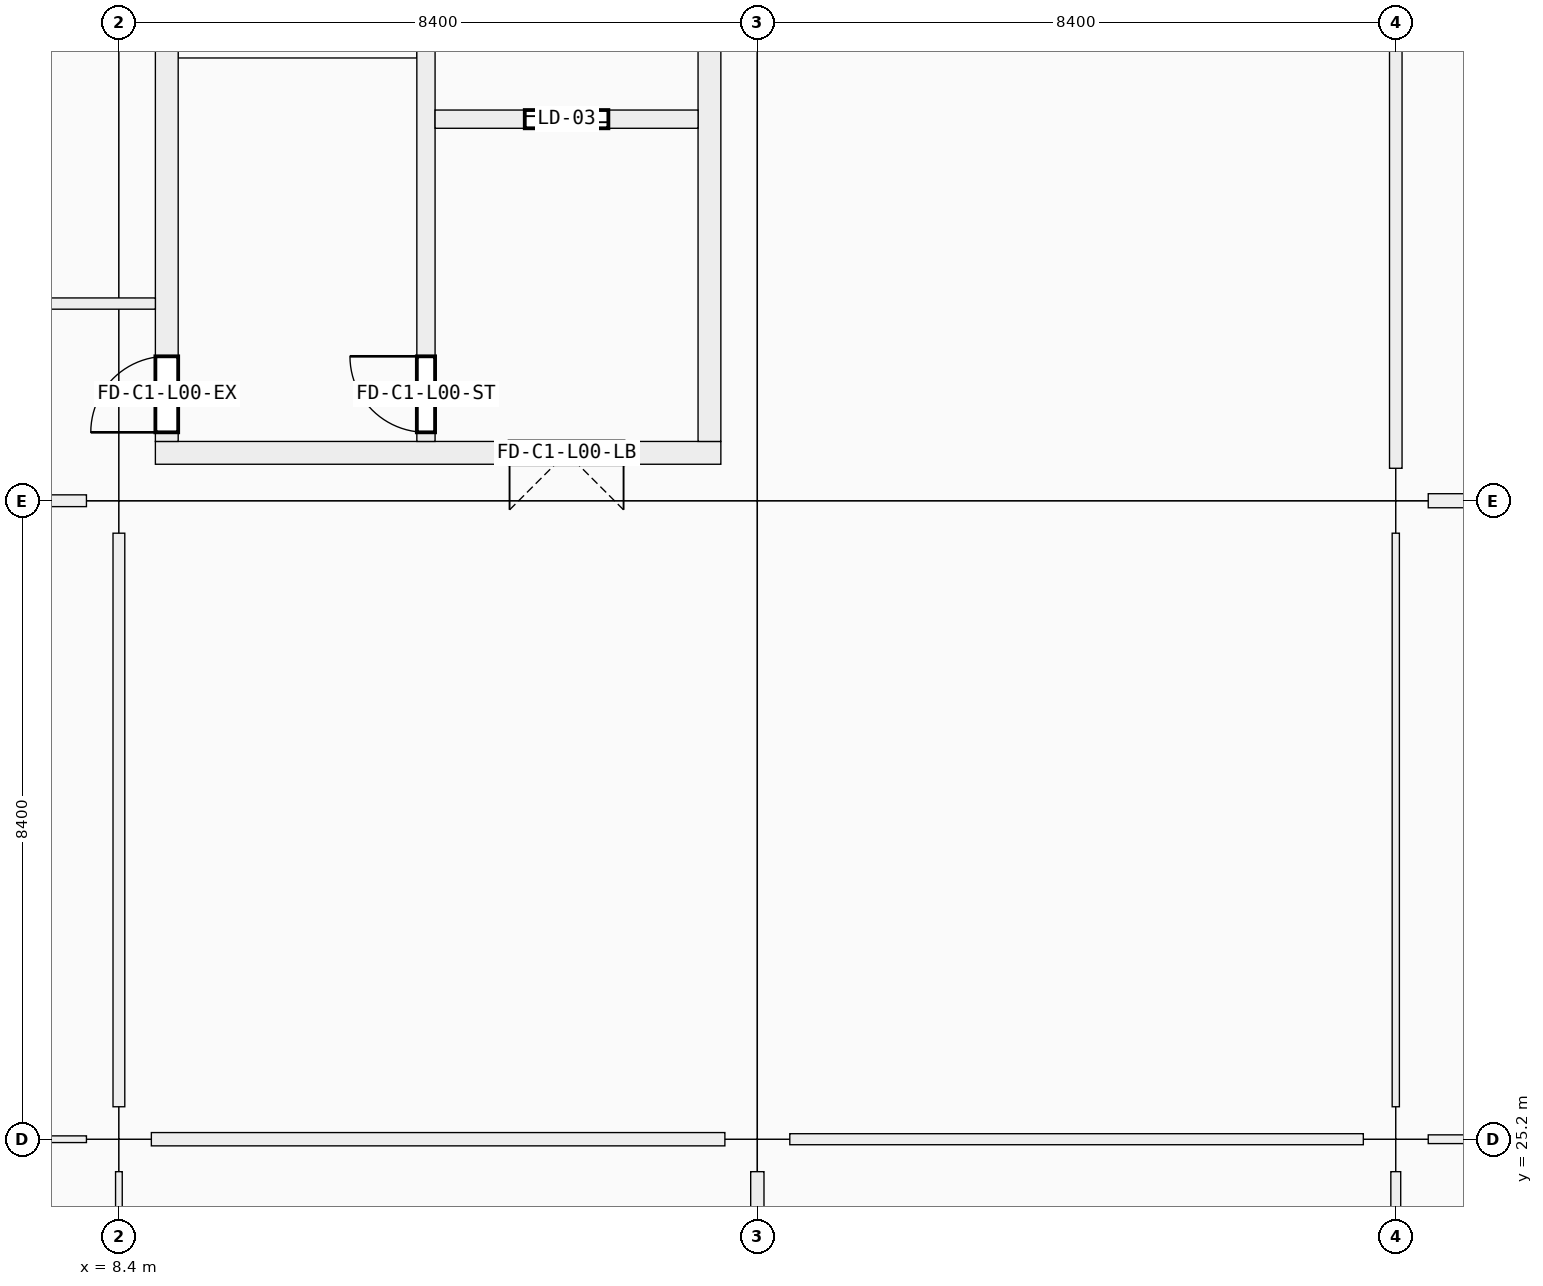
"""IFC4 building model, lengths in metres.
Left out: names, types, materials, properties, quantities, classifications, styles, units other than length and angle.
Written with IfcOpenShell. Run it as: python <this file> out.ifc"""

import sys

from ifc_helpers import new_model, si_unit, direction, frame, frame_2d, origin, origin_2d, place, context, subcontext, project, spatial, rectangle, extrude, element, fill, save


model = new_model("IFC4")
c1 = context("Model", 3, precision=1e-05, world=origin(), true_north=direction((0.0, 1.0)))
c2 = subcontext(c1, "Body", "Model", "MODEL_VIEW")
j1 = project(units=[si_unit("LENGTHUNIT", "METRE"), si_unit("PLANEANGLEUNIT", "RADIAN")], contexts=[c1])
p1 = place(None, origin())
s1 = spatial("IfcSite", under=j1, at=p1, CompositionType="ELEMENT")
p2 = place(p1, origin())
s2 = spatial("IfcBuilding", under=s1, at=p2, CompositionType="ELEMENT")
p3 = place(p2, origin())
s3 = spatial("IfcBuildingStorey", under=s2, at=p3, CompositionType="ELEMENT", Elevation=0.0)
for number, where, z_axis, x_axis in (
    (1, (8.4, 25.2, 0.0), (0.0, 0.0, 1.0), (1.0, 0.0, 0.0)),
    (2, (8.4, 33.6, 0.0), (0.0, 0.0, 1.0), (1.0, 0.0, 0.0)),
    (3, (16.8, 25.2, 0.0), (0.0, 0.0, 1.0), (1.0, 0.0, 0.0)),
    (4, (16.8, 33.6, 0.0), (0.0, 0.0, 1.0), (1.0, 0.0, 0.0)),
    (5, (25.2, 25.2, 0.0), (0.0, 0.0, 1.0), (1.0, 0.0, 0.0)),
    (6, (25.2, 33.6, 0.0), (0.0, 0.0, 1.0), (1.0, 0.0, 0.0)),
):
    element("IfcColumn", number, at=place(p3, frame(where, z_axis=z_axis, x_axis=x_axis)), inside=s3, PredefinedType="COLUMN", context=c2, shape_type="SweptSolid", body=[
        extrude(rectangle(XDim=0.85, YDim=0.85, at=origin_2d()), origin(), (0.0, 0.0, 1.0), 5.76),
    ])
p4 = place(p3, frame((16.32, 34.23, 0.0), z_axis=(0.0, 0.0, 1.0), x_axis=(-1.0, 0.0, 0.0)))
e7 = element("IfcWall", 7, at=p4, inside=s3, PredefinedType="SHEAR", context=c2, shape_type="SweptSolid", body=[
    extrude(rectangle(XDim=7.44, YDim=0.3, at=frame_2d((3.72, 0.0))), origin(), (0.0, 0.0, 1.0), 5.76),
])
p5 = place(p4, frame((1.28, 0.0, 0.0)))
e8 = element("IfcOpeningElement", 8, at=p5, cuts=e7, PredefinedType="OPENING", context=c2, shape_type="SweptSolid", body=[
    extrude(rectangle(XDim=1.5, YDim=2.15, at=frame_2d((0.75, 1.075))), frame((0.0, 0.15, 0.0), z_axis=(0.0, -1.0, 0.0), x_axis=(1.0, 0.0, 0.0)), (0.0, 0.0, 1.0), 0.3),
])
p6 = place(p3, frame((9.03, 34.38, 0.0), z_axis=(0.0, 0.0, 1.0), x_axis=(0.0, 1.0, 0.0)))
e9 = element("IfcWall", 9, at=p6, inside=s3, PredefinedType="SHEAR", context=c2, shape_type="SweptSolid", body=[
    extrude(rectangle(XDim=6.84, YDim=0.3, at=frame_2d((3.42, 0.0))), origin(), (0.0, 0.0, 1.0), 5.76),
])
p7 = place(p6, frame((0.12, 0.0, 0.0)))
e10 = element("IfcOpeningElement", 10, at=p7, cuts=e9, PredefinedType="OPENING", context=c2, shape_type="SweptSolid", body=[
    extrude(rectangle(XDim=1.0, YDim=2.15, at=frame_2d((0.5, 1.075))), frame((0.0, 0.15, 0.0), z_axis=(0.0, -1.0, 0.0), x_axis=(1.0, 0.0, 0.0)), (0.0, 0.0, 1.0), 0.3),
])
p8 = place(p3, frame((16.17, 41.22, 0.0), z_axis=(0.0, 0.0, 1.0), x_axis=(0.0, -1.0, 0.0)))
e11 = element("IfcWall", 11, at=p8, inside=s3, PredefinedType="SHEAR", context=c2, shape_type="SweptSolid", body=[
    extrude(rectangle(XDim=6.84, YDim=0.3, at=frame_2d((3.42, 0.0))), origin(), (0.0, 0.0, 1.0), 5.76),
])
p9 = place(p3, frame((12.44, 34.38, 0.0), z_axis=(0.0, 0.0, 1.0), x_axis=(0.0, 1.0, 0.0)))
e12 = element("IfcWall", 12, at=p9, inside=s3, PredefinedType="SHEAR", context=c2, shape_type="SweptSolid", body=[
    extrude(rectangle(XDim=6.84, YDim=0.24, at=frame_2d((3.42, 0.0))), origin(), (0.0, 0.0, 1.0), 5.76),
])
p10 = place(p9, frame((0.12, 0.0, 0.0)))
e13 = element("IfcOpeningElement", 13, at=p10, cuts=e12, PredefinedType="OPENING", context=c2, shape_type="SweptSolid", body=[
    extrude(rectangle(XDim=1.0, YDim=2.15, at=frame_2d((0.5, 1.075))), frame((0.0, 0.12, 0.0), z_axis=(0.0, -1.0, 0.0), x_axis=(1.0, 0.0, 0.0)), (0.0, 0.0, 1.0), 0.24),
])
p11 = place(p3, frame((12.56, 38.62, 0.0), z_axis=(0.0, 0.0, 1.0), x_axis=(1.0, 0.0, 0.0)))
e14 = element("IfcWall", 14, at=p11, inside=s3, PredefinedType="SHEAR", context=c2, shape_type="SweptSolid", body=[
    extrude(rectangle(XDim=3.46, YDim=0.24, at=frame_2d((1.73, 0.0))), origin(), (0.0, 0.0, 1.0), 5.76),
])
p12 = place(p11, frame((1.18, 0.0, 0.0)))
e15 = element("IfcOpeningElement", 15, at=p12, cuts=e14, PredefinedType="OPENING", context=c2, shape_type="SweptSolid", body=[
    extrude(rectangle(XDim=1.1, YDim=2.15, at=frame_2d((0.55, 1.075))), frame((0.0, 0.12, 0.0), z_axis=(0.0, -1.0, 0.0), x_axis=(1.0, 0.0, 0.0)), (0.0, 0.0, 1.0), 0.24),
])
p13 = place(p3, frame((0.302, 25.2, 0.0), z_axis=(0.0, 0.0, 1.0), x_axis=(1.0, 0.0, 0.0)))
e16 = element("IfcWall", 16, at=p13, inside=s3, PredefinedType="PARTITIONING", context=c2, shape_type="SweptSolid", body=[
    extrude(rectangle(XDim=7.671, YDim=0.088, at=frame_2d((3.835, 0.0))), origin(), (0.0, 0.0, 1.0), 3.66),
])
p14 = place(p13, frame((3.311, 0.0, 0.0)))
e17 = element("IfcOpeningElement", 17, at=p14, cuts=e16, PredefinedType="OPENING", context=c2, shape_type="SweptSolid", body=[
    extrude(rectangle(XDim=1.05, YDim=2.12, at=frame_2d((0.525, 1.06))), frame((0.0, 0.044, 0.0), z_axis=(0.0, -1.0, 0.0), x_axis=(1.0, 0.0, 0.0)), (0.0, 0.0, 1.0), 0.088),
])
p15 = place(p3, frame((0.327, 33.6, 0.0), z_axis=(0.0, 0.0, 1.0), x_axis=(1.0, 0.0, 0.0)))
e18 = element("IfcWall", 18, at=p15, inside=s3, PredefinedType="PARTITIONING", context=c2, shape_type="SweptSolid", body=[
    extrude(rectangle(XDim=7.646, YDim=0.155, at=frame_2d((3.823, 0.0))), origin(), (0.0, 0.0, 1.0), 3.66),
])
p16 = place(p15, frame((3.283, 0.0, 0.0)))
e19 = element("IfcOpeningElement", 19, at=p16, cuts=e18, PredefinedType="OPENING", context=c2, shape_type="SweptSolid", body=[
    extrude(rectangle(XDim=1.08, YDim=2.25, at=frame_2d((0.54, 1.125))), frame((0.0, 0.078, 0.0), z_axis=(0.0, -1.0, 0.0), x_axis=(1.0, 0.0, 0.0)), (0.0, 0.0, 1.0), 0.155),
])
p17 = place(p3, frame((8.827, 25.2, 0.0), z_axis=(0.0, 0.0, 1.0), x_axis=(1.0, 0.0, 0.0)))
e20 = element("IfcWall", 20, at=p17, inside=s3, PredefinedType="PARTITIONING", context=c2, shape_type="SweptSolid", body=[
    extrude(rectangle(XDim=7.546, YDim=0.175, at=frame_2d((3.773, 0.0))), origin(), (0.0, 0.0, 1.0), 3.66),
])
p18 = place(p17, frame((3.253, 0.0, 0.0)))
e21 = element("IfcOpeningElement", 21, at=p18, cuts=e20, PredefinedType="OPENING", context=c2, shape_type="SweptSolid", body=[
    extrude(rectangle(XDim=1.04, YDim=2.2, at=frame_2d((0.52, 1.1))), frame((0.0, 0.087, 0.0), z_axis=(0.0, -1.0, 0.0), x_axis=(1.0, 0.0, 0.0)), (0.0, 0.0, 1.0), 0.175),
])
p19 = place(p3, frame((17.227, 25.2, 0.0), z_axis=(0.0, 0.0, 1.0), x_axis=(1.0, 0.0, 0.0)))
e22 = element("IfcWall", 22, at=p19, inside=s3, PredefinedType="PARTITIONING", context=c2, shape_type="SweptSolid", body=[
    extrude(rectangle(XDim=7.546, YDim=0.145, at=frame_2d((3.773, 0.0))), origin(), (0.0, 0.0, 1.0), 3.66),
])
p20 = place(p19, frame((3.273, 0.0, 0.0)))
e23 = element("IfcOpeningElement", 23, at=p20, cuts=e22, PredefinedType="OPENING", context=c2, shape_type="SweptSolid", body=[
    extrude(rectangle(XDim=1.0, YDim=2.2, at=frame_2d((0.5, 1.1))), frame((0.0, 0.073, 0.0), z_axis=(0.0, -1.0, 0.0), x_axis=(1.0, 0.0, 0.0)), (0.0, 0.0, 1.0), 0.145),
])
p21 = place(p3, frame((25.627, 25.2, 0.0), z_axis=(0.0, 0.0, 1.0), x_axis=(1.0, 0.0, 0.0)))
e24 = element("IfcWall", 24, at=p21, inside=s3, PredefinedType="PARTITIONING", context=c2, shape_type="SweptSolid", body=[
    extrude(rectangle(XDim=7.546, YDim=0.115, at=frame_2d((3.773, 0.0))), origin(), (0.0, 0.0, 1.0), 3.66),
])
p22 = place(p21, frame((3.288, 0.0, 0.0)))
e25 = element("IfcOpeningElement", 25, at=p22, cuts=e24, PredefinedType="OPENING", context=c2, shape_type="SweptSolid", body=[
    extrude(rectangle(XDim=0.97, YDim=2.12, at=frame_2d((0.485, 1.06))), frame((0.0, 0.058, 0.0), z_axis=(0.0, -1.0, 0.0), x_axis=(1.0, 0.0, 0.0)), (0.0, 0.0, 1.0), 0.115),
])
p23 = place(p3, frame((25.627, 33.6, 0.0), z_axis=(0.0, 0.0, 1.0), x_axis=(1.0, 0.0, 0.0)))
e26 = element("IfcWall", 26, at=p23, inside=s3, PredefinedType="PARTITIONING", context=c2, shape_type="SweptSolid", body=[
    extrude(rectangle(XDim=7.546, YDim=0.185, at=frame_2d((3.773, 0.0))), origin(), (0.0, 0.0, 1.0), 3.66),
])
p24 = place(p23, frame((3.308, 0.0, 0.0)))
e27 = element("IfcOpeningElement", 27, at=p24, cuts=e26, PredefinedType="OPENING", context=c2, shape_type="SweptSolid", body=[
    extrude(rectangle(XDim=0.93, YDim=2.12, at=frame_2d((0.465, 1.06))), frame((0.0, 0.093, 0.0), z_axis=(0.0, -1.0, 0.0), x_axis=(1.0, 0.0, 0.0)), (0.0, 0.0, 1.0), 0.185),
])
p25 = place(p3, frame((8.4, 17.227, 0.0), z_axis=(0.0, 0.0, 1.0), x_axis=(0.0, 1.0, 0.0)))
e28 = element("IfcWall", 28, at=p25, inside=s3, PredefinedType="PARTITIONING", context=c2, shape_type="SweptSolid", body=[
    extrude(rectangle(XDim=7.546, YDim=0.088, at=frame_2d((3.773, 0.0))), origin(), (0.0, 0.0, 1.0), 3.66),
])
p26 = place(p25, frame((3.293, 0.0, 0.0)))
e29 = element("IfcOpeningElement", 29, at=p26, cuts=e28, PredefinedType="OPENING", context=c2, shape_type="SweptSolid", body=[
    extrude(rectangle(XDim=0.96, YDim=2.18, at=frame_2d((0.48, 1.09))), frame((0.0, 0.044, 0.0), z_axis=(0.0, -1.0, 0.0), x_axis=(1.0, 0.0, 0.0)), (0.0, 0.0, 1.0), 0.088),
])
p27 = place(p3, frame((8.4, 25.627, 0.0), z_axis=(0.0, 0.0, 1.0), x_axis=(0.0, 1.0, 0.0)))
e30 = element("IfcWall", 30, at=p27, inside=s3, PredefinedType="PARTITIONING", context=c2, shape_type="SweptSolid", body=[
    extrude(rectangle(XDim=7.546, YDim=0.155, at=frame_2d((3.773, 0.0))), origin(), (0.0, 0.0, 1.0), 3.66),
])
p28 = place(p27, frame((3.253, 0.0, 0.0)))
e31 = element("IfcOpeningElement", 31, at=p28, cuts=e30, PredefinedType="OPENING", context=c2, shape_type="SweptSolid", body=[
    extrude(rectangle(XDim=1.04, YDim=2.2, at=frame_2d((0.52, 1.1))), frame((0.0, 0.078, 0.0), z_axis=(0.0, -1.0, 0.0), x_axis=(1.0, 0.0, 0.0)), (0.0, 0.0, 1.0), 0.155),
])
p29 = place(p3, frame((16.8, 17.227, 0.0), z_axis=(0.0, 0.0, 1.0), x_axis=(0.0, 1.0, 0.0)))
e32 = element("IfcWall", 32, at=p29, inside=s3, PredefinedType="PARTITIONING", context=c2, shape_type="SweptSolid", body=[
    extrude(rectangle(XDim=7.546, YDim=0.175, at=frame_2d((3.773, 0.0))), origin(), (0.0, 0.0, 1.0), 3.66),
])
p30 = place(p29, frame((3.313, 0.0, 0.0)))
e33 = element("IfcOpeningElement", 33, at=p30, cuts=e32, PredefinedType="OPENING", context=c2, shape_type="SweptSolid", body=[
    extrude(rectangle(XDim=0.92, YDim=2.15, at=frame_2d((0.46, 1.075))), frame((0.0, 0.087, 0.0), z_axis=(0.0, -1.0, 0.0), x_axis=(1.0, 0.0, 0.0)), (0.0, 0.0, 1.0), 0.175),
])
p31 = place(p3, frame((25.2, 17.227, 0.0), z_axis=(0.0, 0.0, 1.0), x_axis=(0.0, 1.0, 0.0)))
e34 = element("IfcWall", 34, at=p31, inside=s3, PredefinedType="MOVABLE", context=c2, shape_type="SweptSolid", body=[
    extrude(rectangle(XDim=7.546, YDim=0.13, at=frame_2d((3.773, 0.0))), origin(), (0.0, 0.0, 1.0), 3.66),
])
p32 = place(p31, frame((3.268, 0.0, 0.0)))
e35 = element("IfcOpeningElement", 35, at=p32, cuts=e34, PredefinedType="OPENING", context=c2, shape_type="SweptSolid", body=[
    extrude(rectangle(XDim=1.01, YDim=2.12, at=frame_2d((0.505, 1.06))), frame((0.0, 0.065, 0.0), z_axis=(0.0, -1.0, 0.0), x_axis=(1.0, 0.0, 0.0)), (0.0, 0.0, 1.0), 0.13),
])
p33 = place(p3, frame((25.2, 25.627, 0.0), z_axis=(0.0, 0.0, 1.0), x_axis=(0.0, 1.0, 0.0)))
e36 = element("IfcWall", 36, at=p33, inside=s3, PredefinedType="PARTITIONING", context=c2, shape_type="SweptSolid", body=[
    extrude(rectangle(XDim=7.546, YDim=0.095, at=frame_2d((3.773, 0.0))), origin(), (0.0, 0.0, 1.0), 3.66),
])
p34 = place(p33, frame((3.283, 0.0, 0.0)))
e37 = element("IfcOpeningElement", 37, at=p34, cuts=e36, PredefinedType="OPENING", context=c2, shape_type="SweptSolid", body=[
    extrude(rectangle(XDim=0.98, YDim=2.18, at=frame_2d((0.49, 1.09))), frame((0.0, 0.047, 0.0), z_axis=(0.0, -1.0, 0.0), x_axis=(1.0, 0.0, 0.0)), (0.0, 0.0, 1.0), 0.095),
])
p35 = place(p3, frame((25.2, 34.027, 0.0), z_axis=(0.0, 0.0, 1.0), x_axis=(0.0, 1.0, 0.0)))
e38 = element("IfcWall", 38, at=p35, inside=s3, PredefinedType="PARTITIONING", context=c2, shape_type="SweptSolid", body=[
    extrude(rectangle(XDim=7.546, YDim=0.165, at=frame_2d((3.773, 0.0))), origin(), (0.0, 0.0, 1.0), 3.66),
])
p36 = place(p35, frame((3.293, 0.0, 0.0)))
e39 = element("IfcOpeningElement", 39, at=p36, cuts=e38, PredefinedType="OPENING", context=c2, shape_type="SweptSolid", body=[
    extrude(rectangle(XDim=0.96, YDim=2.18, at=frame_2d((0.48, 1.09))), frame((0.0, 0.083, 0.0), z_axis=(0.0, -1.0, 0.0), x_axis=(1.0, 0.0, 0.0)), (0.0, 0.0, 1.0), 0.165),
])
p37 = place(p3, frame((0.16, 36.194, 0.0), z_axis=(0.0, 0.0, 1.0), x_axis=(1.0, 0.0, 0.0)))
e40 = element("IfcWall", 40, at=p37, inside=s3, PredefinedType="PARTITIONING", context=c2, shape_type="SweptSolid", body=[
    extrude(rectangle(XDim=8.72, YDim=0.148, at=frame_2d((4.36, 0.0))), origin(), (0.0, 0.0, 1.0), 3.66),
])
p38 = place(p10, origin())
e41 = element("IfcDoor", 41, at=p38, inside=s3, OperationType="SINGLE_SWING_RIGHT", PredefinedType="DOOR", context=c2, shape_type="SweptSolid", body=[
    extrude(rectangle(XDim=1.0, YDim=2.15, at=frame_2d((0.5, 1.075))), frame((0.0, 0.025, 0.0), z_axis=(0.0, -1.0, 0.0), x_axis=(1.0, 0.0, 0.0)), (0.0, 0.0, 1.0), 0.05),
])
fill(e13, e41)
p39 = place(p5, origin())
e42 = element("IfcDoor", 42, at=p39, inside=s3, OperationType="DOUBLE_DOOR_SINGLE_SWING", PredefinedType="DOOR", context=c2, shape_type="SweptSolid", body=[
    extrude(rectangle(XDim=1.5, YDim=2.15, at=frame_2d((0.75, 1.075))), frame((0.0, 0.025, 0.0), z_axis=(0.0, -1.0, 0.0), x_axis=(1.0, 0.0, 0.0)), (0.0, 0.0, 1.0), 0.05),
])
fill(e8, e42)
p40 = place(p7, origin())
e43 = element("IfcDoor", 43, at=p40, inside=s3, OperationType="SINGLE_SWING_LEFT", PredefinedType="DOOR", context=c2, shape_type="SweptSolid", body=[
    extrude(rectangle(XDim=1.0, YDim=2.15, at=frame_2d((0.5, 1.075))), frame((0.0, 0.025, 0.0), z_axis=(0.0, -1.0, 0.0), x_axis=(1.0, 0.0, 0.0)), (0.0, 0.0, 1.0), 0.05),
])
fill(e10, e43)
p41 = place(p12, origin())
e44 = element("IfcDoor", 44, at=p41, inside=s3, OperationType="DOUBLE_DOOR_SLIDING", PredefinedType="DOOR", context=c2, shape_type="SweptSolid", body=[
    extrude(rectangle(XDim=1.1, YDim=2.15, at=frame_2d((0.55, 1.075))), frame((0.0, 0.025, 0.0), z_axis=(0.0, -1.0, 0.0), x_axis=(1.0, 0.0, 0.0)), (0.0, 0.0, 1.0), 0.05),
])
fill(e15, e44)
p42 = place(p18, origin())
e45 = element("IfcDoor", 45, at=p42, inside=s3, OperationType="SINGLE_SWING_LEFT", PredefinedType="DOOR", context=c2, shape_type="SweptSolid", body=[
    extrude(rectangle(XDim=1.04, YDim=2.2, at=frame_2d((0.52, 1.1))), frame((0.0, 0.025, 0.0), z_axis=(0.0, -1.0, 0.0), x_axis=(1.0, 0.0, 0.0)), (0.0, 0.0, 1.0), 0.05),
])
fill(e21, e45)
p43 = place(p20, origin())
e46 = element("IfcDoor", 46, at=p43, inside=s3, OperationType="SINGLE_SWING_LEFT", PredefinedType="DOOR", context=c2, shape_type="SweptSolid", body=[
    extrude(rectangle(XDim=1.0, YDim=2.2, at=frame_2d((0.5, 1.1))), frame((0.0, 0.025, 0.0), z_axis=(0.0, -1.0, 0.0), x_axis=(1.0, 0.0, 0.0)), (0.0, 0.0, 1.0), 0.05),
])
fill(e23, e46)
p44 = place(p28, origin())
e47 = element("IfcDoor", 47, at=p44, inside=s3, OperationType="SINGLE_SWING_RIGHT", PredefinedType="DOOR", context=c2, shape_type="SweptSolid", body=[
    extrude(rectangle(XDim=1.04, YDim=2.2, at=frame_2d((0.52, 1.1))), frame((0.0, 0.025, 0.0), z_axis=(0.0, -1.0, 0.0), x_axis=(1.0, 0.0, 0.0)), (0.0, 0.0, 1.0), 0.05),
])
fill(e31, e47)
p45 = place(p34, origin())
e48 = element("IfcDoor", 48, at=p45, inside=s3, OperationType="SINGLE_SWING_LEFT", PredefinedType="DOOR", context=c2, shape_type="SweptSolid", body=[
    extrude(rectangle(XDim=0.98, YDim=2.18, at=frame_2d((0.49, 1.09))), frame((0.0, 0.025, 0.0), z_axis=(0.0, -1.0, 0.0), x_axis=(1.0, 0.0, 0.0)), (0.0, 0.0, 1.0), 0.05),
])
fill(e37, e48)
p46 = place(p36, origin())
e49 = element("IfcDoor", 49, at=p46, inside=s3, OperationType="SINGLE_SWING_RIGHT", PredefinedType="DOOR", context=c2, shape_type="SweptSolid", body=[
    extrude(rectangle(XDim=0.96, YDim=2.18, at=frame_2d((0.48, 1.09))), frame((0.0, 0.025, 0.0), z_axis=(0.0, -1.0, 0.0), x_axis=(1.0, 0.0, 0.0)), (0.0, 0.0, 1.0), 0.05),
])
fill(e39, e49)
save(model, sys.argv[1])
